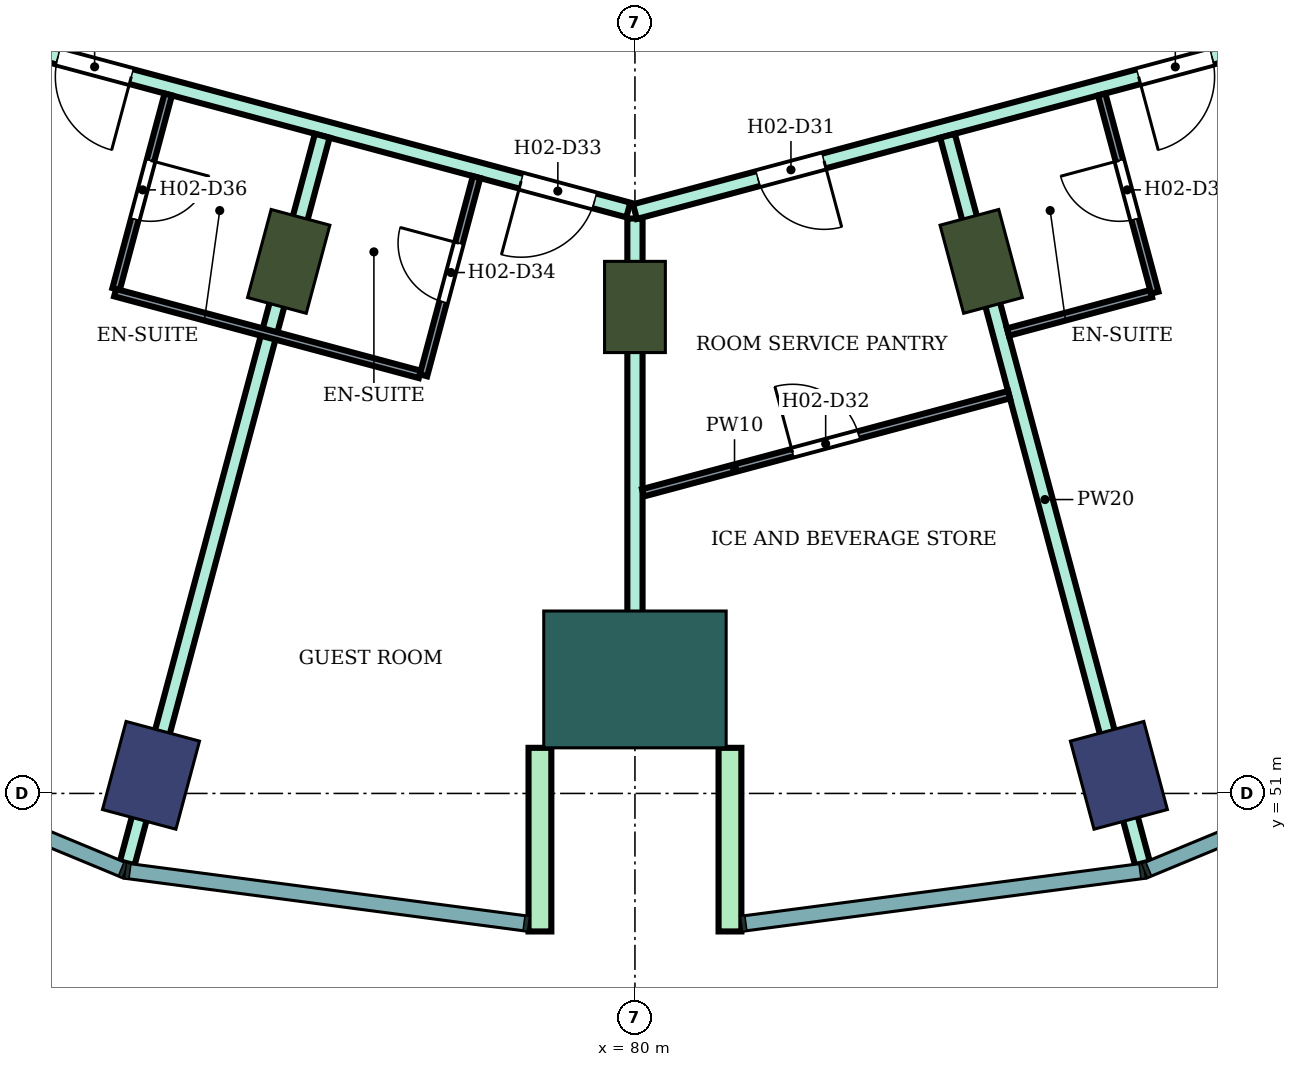
"""IFC4 building model, lengths in metres.
Left out: names, types, materials, properties, quantities, classifications, styles, units other than length and angle.
Written with IfcOpenShell. Run it as: python <this file> out.ifc"""

import sys

from ifc_helpers import new_model, si_unit, direction, frame, frame_2d, origin, origin_2d, place, context, subcontext, project, spatial, rectangle, extrude, element, fill, save


model = new_model("IFC4")
c1 = context("Model", 3, precision=1e-05, world=origin(), true_north=direction((0.0, 1.0)))
c2 = subcontext(c1, "Body", "Model", "MODEL_VIEW")
j1 = project(units=[si_unit("LENGTHUNIT", "METRE"), si_unit("PLANEANGLEUNIT", "RADIAN")], contexts=[c1])
p1 = place(None, origin())
s1 = spatial("IfcSite", under=j1, at=p1, CompositionType="ELEMENT")
p2 = place(p1, origin())
s2 = spatial("IfcBuilding", under=s1, at=p2, CompositionType="ELEMENT")
p3 = place(p2, frame((0.0, 0.0, 44.0)))
s3 = spatial("IfcBuildingStorey", under=s2, at=p3, CompositionType="ELEMENT", Elevation=44.0)
for number, where, z_axis, x_axis in (
    (1, (73.633, 51.238, 0.0), (0.0, 0.0, 1.0), (-0.259, -0.966, 0.0)),
    (2, (86.367, 51.238, 0.0), (0.0, 0.0, 1.0), (0.259, -0.966, 0.0)),
):
    element("IfcColumn", number, at=place(p3, frame(where, z_axis=z_axis, x_axis=x_axis)), inside=s3, PredefinedType="COLUMN", context=c2, shape_type="SweptSolid", body=[
        extrude(rectangle(XDim=1.2, YDim=1.0, at=origin_2d()), origin(), (0.0, 0.0, 1.0), 3.8),
    ])
for number, where, z_axis, x_axis in (
    (3, (75.445, 58.0, 0.0), (0.0, 0.0, 1.0), (-0.259, -0.966, 0.0)),
    (4, (80.0, 57.4, 0.0), (0.0, 0.0, 1.0), (0.0, -1.0, 0.0)),
    (5, (84.555, 58.0, 0.0), (0.0, 0.0, 1.0), (0.259, -0.966, 0.0)),
):
    element("IfcColumn", number, at=place(p3, frame(where, z_axis=z_axis, x_axis=x_axis)), inside=s3, PredefinedType="COLUMN", context=c2, shape_type="SweptSolid", body=[
        extrude(rectangle(XDim=1.2, YDim=0.8, at=origin_2d()), origin(), (0.0, 0.0, 1.0), 3.8),
    ])
p4 = place(p3, frame((80.0, 52.5, 0.0), z_axis=(0.0, 0.0, 1.0), x_axis=(0.0, -1.0, 0.0)))
e6 = element("IfcColumn", 6, at=p4, inside=s3, PredefinedType="COLUMN", context=c2, shape_type="SweptSolid", body=[
    extrude(rectangle(XDim=1.8, YDim=2.4, at=origin_2d()), origin(), (0.0, 0.0, 1.0), 3.8),
])
for number, where, z_axis, x_axis in (
    (7, (78.75, 51.6, 0.0), (0.0, 0.0, 1.0), (0.0, -1.0, 0.0)),
    (8, (81.25, 51.6, 0.0), (0.0, 0.0, 1.0), (0.0, -1.0, 0.0)),
):
    element("IfcWall", number, at=place(p3, frame(where, z_axis=z_axis, x_axis=x_axis)), inside=s3, PredefinedType="NOTDEFINED", context=c2, shape_type="SweptSolid", body=[
        extrude(rectangle(XDim=2.416, YDim=0.3, at=frame_2d((1.208, 0.0))), origin(), (0.0, 0.0, 1.0), 3.8),
    ])
p5 = place(p3, frame((71.877, 60.832, 0.0), z_axis=(0.0, 0.0, 1.0), x_axis=(0.965852509869, -0.259092510851, 0.0)))
e9 = element("IfcWall", 9, at=p5, inside=s3, PredefinedType="PARTITIONING", context=c2, shape_type="SweptSolid", body=[
    extrude(rectangle(XDim=8.32, YDim=0.2, at=frame_2d((4.16, 0.0))), origin(), (0.0, 0.0, 1.0), 3.35),
])
p6 = place(p5, frame((6.86, 0.0, 0.0)))
e10 = element("IfcOpeningElement", 10, at=p6, cuts=e9, PredefinedType="OPENING", context=c2, shape_type="SweptSolid", body=[
    extrude(rectangle(XDim=1.0, YDim=2.1, at=frame_2d((0.5, 1.05))), frame((0.0, 0.11, 0.0), z_axis=(0.0, -1.0, 0.0), x_axis=(1.0, 0.0, 0.0)), (0.0, 0.0, 1.0), 0.22),
])
p7 = place(p5, frame((0.55, 0.0, 0.0)))
e11 = element("IfcOpeningElement", 11, at=p7, cuts=e9, PredefinedType="OPENING", context=c2, shape_type="SweptSolid", body=[
    extrude(rectangle(XDim=1.0, YDim=2.1, at=frame_2d((0.5, 1.05))), frame((0.0, 0.11, 0.0), z_axis=(0.0, -1.0, 0.0), x_axis=(1.0, 0.0, 0.0)), (0.0, 0.0, 1.0), 0.22),
])
p8 = place(p3, frame((73.321, 50.081, 0.0), z_axis=(0.0, 0.0, 1.0), x_axis=(0.25891218439, 0.965900864879, 0.0)))
e12 = element("IfcWall", 12, at=p8, inside=s3, PredefinedType="PARTITIONING", context=c2, shape_type="SweptSolid", body=[
    extrude(rectangle(XDim=9.909, YDim=0.2, at=frame_2d((4.955, 0.0))), origin(), (0.0, 0.0, 1.0), 3.35),
])
p9 = place(p3, frame((80.0, 51.8, 0.0), z_axis=(0.0, 0.0, 1.0), x_axis=(0.0, 1.0, 0.0)))
e13 = element("IfcWall", 13, at=p9, inside=s3, PredefinedType="PARTITIONING", context=c2, shape_type="SweptSolid", body=[
    extrude(rectangle(XDim=6.764, YDim=0.2, at=frame_2d((3.382, 0.0))), origin(), (0.0, 0.0, 1.0), 3.35),
])
p10 = place(p3, frame((80.0, 58.655, 0.0), z_axis=(0.0, 0.0, 1.0), x_axis=(0.965967338894, 0.258664068224, 0.0)))
e14 = element("IfcWall", 14, at=p10, inside=s3, PredefinedType="PARTITIONING", context=c2, shape_type="SweptSolid", body=[
    extrude(rectangle(XDim=8.36, YDim=0.2, at=frame_2d((4.18, 0.0))), origin(), (0.0, 0.0, 1.0), 3.35),
])
p11 = place(p10, frame((6.86, 0.0, 0.0)))
e15 = element("IfcOpeningElement", 15, at=p11, cuts=e14, PredefinedType="OPENING", context=c2, shape_type="SweptSolid", body=[
    extrude(rectangle(XDim=1.0, YDim=2.1, at=frame_2d((0.5, 1.05))), frame((0.0, 0.11, 0.0), z_axis=(0.0, -1.0, 0.0), x_axis=(1.0, 0.0, 0.0)), (0.0, 0.0, 1.0), 0.22),
])
p12 = place(p10, frame((1.675, 0.0, 0.0)))
e16 = element("IfcOpeningElement", 16, at=p12, cuts=e14, PredefinedType="OPENING", context=c2, shape_type="SweptSolid", body=[
    extrude(rectangle(XDim=0.9, YDim=2.1, at=frame_2d((0.45, 1.05))), frame((0.0, 0.11, 0.0), z_axis=(0.0, -1.0, 0.0), x_axis=(1.0, 0.0, 0.0)), (0.0, 0.0, 1.0), 0.22),
])
p13 = place(p3, frame((84.112, 59.652, 0.0), z_axis=(0.0, 0.0, 1.0), x_axis=(0.258791091927, -0.965933315886, 0.0)))
e17 = element("IfcWall", 17, at=p13, inside=s3, PredefinedType="PARTITIONING", context=c2, shape_type="SweptSolid", body=[
    extrude(rectangle(XDim=9.909, YDim=0.2, at=frame_2d((4.955, 0.0))), origin(), (0.0, 0.0, 1.0), 3.35),
])
p14 = place(p3, frame((73.174, 57.636, 0.0), z_axis=(0.0, 0.0, 1.0), x_axis=(0.258952498977, 0.96589005755, 0.0)))
e18 = element("IfcWall", 18, at=p14, inside=s3, PredefinedType="PARTITIONING", context=c2, shape_type="SweptSolid", body=[
    extrude(rectangle(XDim=2.65, YDim=0.1, at=frame_2d((1.325, 0.0))), origin(), (0.0, 0.0, 1.0), 3.35),
])
p15 = place(p14, frame((0.95, 0.0, 0.0)))
e19 = element("IfcOpeningElement", 19, at=p15, cuts=e18, PredefinedType="OPENING", context=c2, shape_type="SweptSolid", body=[
    extrude(rectangle(XDim=0.8, YDim=2.1, at=frame_2d((0.4, 1.05))), frame((0.0, 0.06, 0.0), z_axis=(0.0, -1.0, 0.0), x_axis=(1.0, 0.0, 0.0)), (0.0, 0.0, 1.0), 0.12),
])
p16 = place(p3, frame((73.161, 57.588, 0.0), z_axis=(0.0, 0.0, 1.0), x_axis=(0.965858994467, -0.259068336173, 0.0)))
e20 = element("IfcWall", 20, at=p16, inside=s3, PredefinedType="PARTITIONING", context=c2, shape_type="SweptSolid", body=[
    extrude(rectangle(XDim=4.15, YDim=0.1, at=frame_2d((2.075, 0.0))), origin(), (0.0, 0.0, 1.0), 3.35),
])
p17 = place(p3, frame((77.218, 56.501, 0.0), z_axis=(0.0, 0.0, 1.0), x_axis=(0.258591408257, 0.965986792651, 0.0)))
e21 = element("IfcWall", 21, at=p17, inside=s3, PredefinedType="PARTITIONING", context=c2, shape_type="SweptSolid", body=[
    extrude(rectangle(XDim=2.699, YDim=0.1, at=frame_2d((1.35, 0.0))), origin(), (0.0, 0.0, 1.0), 3.35),
])
p18 = place(p17, frame((1.0, 0.0, 0.0)))
e22 = element("IfcOpeningElement", 22, at=p18, cuts=e21, PredefinedType="OPENING", context=c2, shape_type="SweptSolid", body=[
    extrude(rectangle(XDim=0.8, YDim=2.1, at=frame_2d((0.4, 1.05))), frame((0.0, 0.06, 0.0), z_axis=(0.0, -1.0, 0.0), x_axis=(1.0, 0.0, 0.0)), (0.0, 0.0, 1.0), 0.12),
])
p19 = place(p3, frame((80.106, 54.956, 0.0), z_axis=(0.0, 0.0, 1.0), x_axis=(0.965910666284, 0.258875616386, 0.0)))
e23 = element("IfcWall", 23, at=p19, inside=s3, PredefinedType="PARTITIONING", context=c2, shape_type="SweptSolid", body=[
    extrude(rectangle(XDim=4.985, YDim=0.1, at=frame_2d((2.493, 0.0))), origin(), (0.0, 0.0, 1.0), 3.35),
])
p20 = place(p19, frame((2.038, 0.0, 0.0)))
e24 = element("IfcOpeningElement", 24, at=p20, cuts=e23, PredefinedType="OPENING", context=c2, shape_type="SweptSolid", body=[
    extrude(rectangle(XDim=0.9, YDim=2.1, at=frame_2d((0.45, 1.05))), frame((0.0, 0.06, 0.0), z_axis=(0.0, -1.0, 0.0), x_axis=(1.0, 0.0, 0.0)), (0.0, 0.0, 1.0), 0.12),
])
p21 = place(p3, frame((84.908, 57.07, 0.0), z_axis=(0.0, 0.0, 1.0), x_axis=(0.965853538138, 0.25908867761, 0.0)))
e25 = element("IfcWall", 25, at=p21, inside=s3, PredefinedType="PARTITIONING", context=c2, shape_type="SweptSolid", body=[
    extrude(rectangle(XDim=1.95, YDim=0.1, at=frame_2d((0.975, 0.0))), origin(), (0.0, 0.0, 1.0), 3.35),
])
p22 = place(p3, frame((86.14, 60.196, 0.0), z_axis=(0.0, 0.0, 1.0), x_axis=(0.258945475746, -0.965891940432, 0.0)))
e26 = element("IfcWall", 26, at=p22, inside=s3, PredefinedType="PARTITIONING", context=c2, shape_type="SweptSolid", body=[
    extrude(rectangle(XDim=2.7, YDim=0.1, at=frame_2d((1.35, 0.0))), origin(), (0.0, 0.0, 1.0), 3.35),
])
p23 = place(p22, frame((0.9, 0.0, 0.0)))
e27 = element("IfcOpeningElement", 27, at=p23, cuts=e26, PredefinedType="OPENING", context=c2, shape_type="SweptSolid", body=[
    extrude(rectangle(XDim=0.8, YDim=2.1, at=frame_2d((0.4, 1.05))), frame((0.0, 0.06, 0.0), z_axis=(0.0, -1.0, 0.0), x_axis=(1.0, 0.0, 0.0)), (0.0, 0.0, 1.0), 0.12),
])
p24 = place(p11, frame((1.0, 0.0, 0.0), z_axis=(0.0, 0.0, 1.0), x_axis=(-1.0, 0.0, 0.0)))
e28 = element("IfcDoor", 28, at=p24, inside=s3, OperationType="SINGLE_SWING_RIGHT", PredefinedType="DOOR", context=c2, shape_type="SweptSolid", body=[
    extrude(rectangle(XDim=1.0, YDim=2.1, at=frame_2d((0.5, 1.05))), frame((0.0, 0.025, 0.0), z_axis=(0.0, -1.0, 0.0), x_axis=(1.0, 0.0, 0.0)), (0.0, 0.0, 1.0), 0.05),
])
fill(e15, e28)
p25 = place(p23, frame((0.8, 0.0, 0.0), z_axis=(0.0, 0.0, 1.0), x_axis=(-1.0, 0.0, 0.0)))
e29 = element("IfcDoor", 29, at=p25, inside=s3, OperationType="SINGLE_SWING_RIGHT", PredefinedType="DOOR", context=c2, shape_type="SweptSolid", body=[
    extrude(rectangle(XDim=0.8, YDim=2.1, at=frame_2d((0.4, 1.05))), frame((0.0, 0.025, 0.0), z_axis=(0.0, -1.0, 0.0), x_axis=(1.0, 0.0, 0.0)), (0.0, 0.0, 1.0), 0.05),
])
fill(e27, e29)
p26 = place(p12, frame((0.9, 0.0, 0.0), z_axis=(0.0, 0.0, 1.0), x_axis=(-1.0, 0.0, 0.0)))
e30 = element("IfcDoor", 30, at=p26, inside=s3, OperationType="SINGLE_SWING_LEFT", PredefinedType="DOOR", context=c2, shape_type="SweptSolid", body=[
    extrude(rectangle(XDim=0.9, YDim=2.1, at=frame_2d((0.45, 1.05))), frame((0.0, 0.025, 0.0), z_axis=(0.0, -1.0, 0.0), x_axis=(1.0, 0.0, 0.0)), (0.0, 0.0, 1.0), 0.05),
])
fill(e16, e30)
p27 = place(p20, origin())
e31 = element("IfcDoor", 31, at=p27, inside=s3, OperationType="SINGLE_SWING_LEFT", PredefinedType="DOOR", context=c2, shape_type="SweptSolid", body=[
    extrude(rectangle(XDim=0.9, YDim=2.1, at=frame_2d((0.45, 1.05))), frame((0.0, 0.025, 0.0), z_axis=(0.0, -1.0, 0.0), x_axis=(1.0, 0.0, 0.0)), (0.0, 0.0, 1.0), 0.05),
])
fill(e24, e31)
p28 = place(p6, frame((1.0, 0.0, 0.0), z_axis=(0.0, 0.0, 1.0), x_axis=(-1.0, 0.0, 0.0)))
e32 = element("IfcDoor", 32, at=p28, inside=s3, OperationType="SINGLE_SWING_RIGHT", PredefinedType="DOOR", context=c2, shape_type="SweptSolid", body=[
    extrude(rectangle(XDim=1.0, YDim=2.1, at=frame_2d((0.5, 1.05))), frame((0.0, 0.025, 0.0), z_axis=(0.0, -1.0, 0.0), x_axis=(1.0, 0.0, 0.0)), (0.0, 0.0, 1.0), 0.05),
])
fill(e10, e32)
p29 = place(p18, origin())
e33 = element("IfcDoor", 33, at=p29, inside=s3, OperationType="SINGLE_SWING_RIGHT", PredefinedType="DOOR", context=c2, shape_type="SweptSolid", body=[
    extrude(rectangle(XDim=0.8, YDim=2.1, at=frame_2d((0.4, 1.05))), frame((0.0, 0.025, 0.0), z_axis=(0.0, -1.0, 0.0), x_axis=(1.0, 0.0, 0.0)), (0.0, 0.0, 1.0), 0.05),
])
fill(e22, e33)
p30 = place(p7, frame((1.0, 0.0, 0.0), z_axis=(0.0, 0.0, 1.0), x_axis=(-1.0, 0.0, 0.0)))
e34 = element("IfcDoor", 34, at=p30, inside=s3, OperationType="SINGLE_SWING_LEFT", PredefinedType="DOOR", context=c2, shape_type="SweptSolid", body=[
    extrude(rectangle(XDim=1.0, YDim=2.1, at=frame_2d((0.5, 1.05))), frame((0.0, 0.025, 0.0), z_axis=(0.0, -1.0, 0.0), x_axis=(1.0, 0.0, 0.0)), (0.0, 0.0, 1.0), 0.05),
])
fill(e11, e34)
p31 = place(p15, frame((0.8, 0.0, 0.0), z_axis=(0.0, 0.0, 1.0), x_axis=(-1.0, 0.0, 0.0)))
e35 = element("IfcDoor", 35, at=p31, inside=s3, OperationType="SINGLE_SWING_LEFT", PredefinedType="DOOR", context=c2, shape_type="SweptSolid", body=[
    extrude(rectangle(XDim=0.8, YDim=2.1, at=frame_2d((0.4, 1.05))), frame((0.0, 0.025, 0.0), z_axis=(0.0, -1.0, 0.0), x_axis=(1.0, 0.0, 0.0)), (0.0, 0.0, 1.0), 0.05),
])
fill(e19, e35)
save(model, sys.argv[1])
